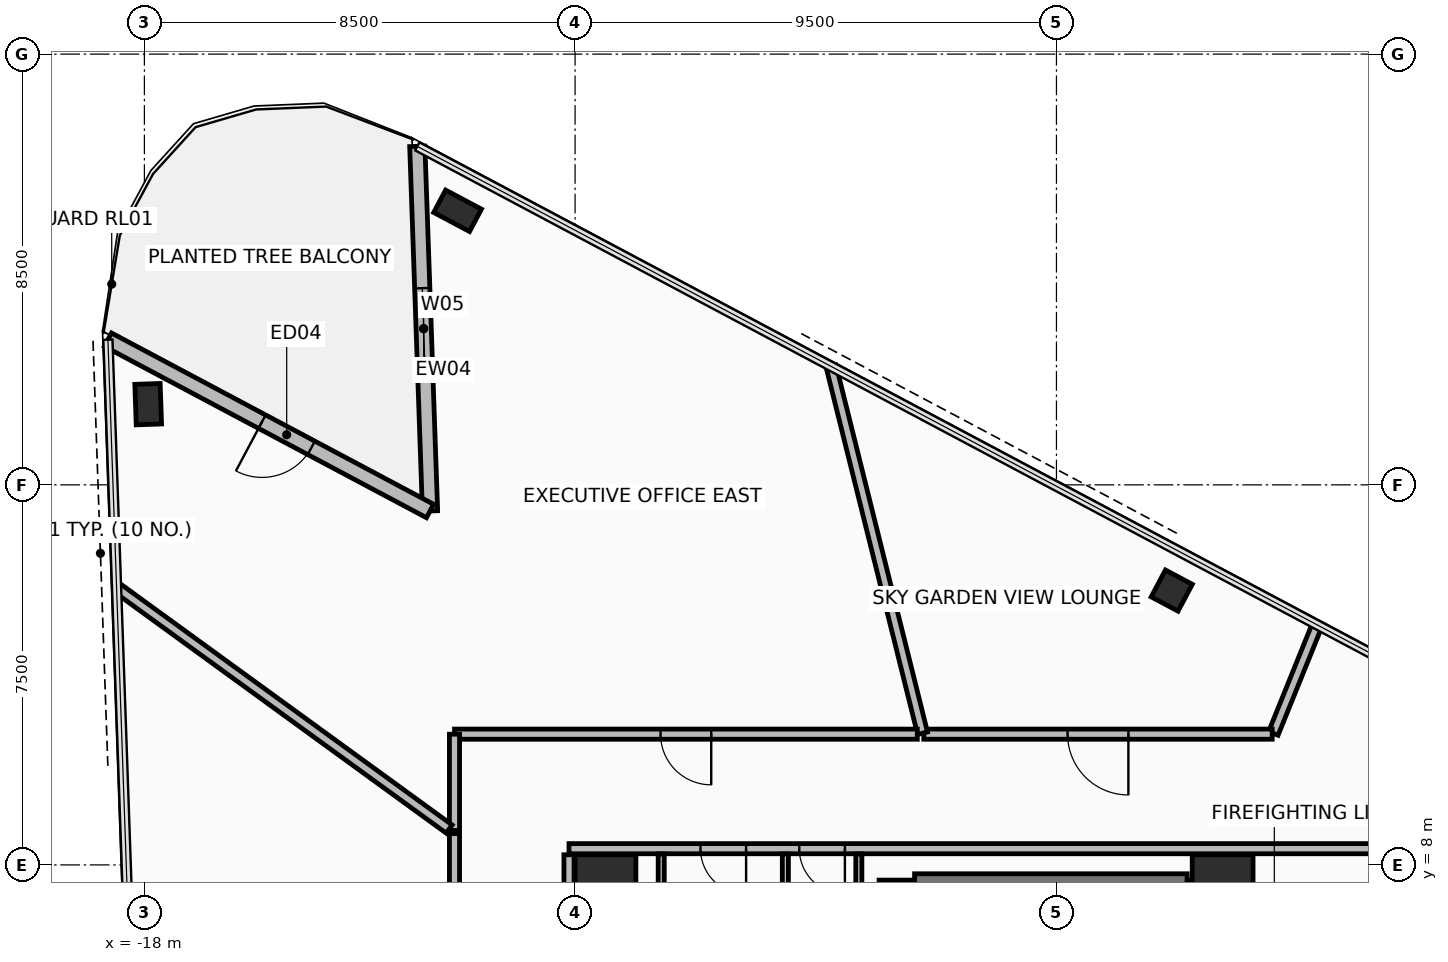
"""IFC4 building model, lengths in metres.
Left out: names, types, materials, properties, quantities, classifications, styles, units other than length and angle.
Written with IfcOpenShell. Run it as: python <this file> out.ifc"""

import sys

from ifc_helpers import new_model, si_unit, direction, frame, frame_2d, origin, origin_2d, place, context, subcontext, project, spatial, rectangle, hollow_rectangle, extrude, element, fill, save


model = new_model("IFC4")
c1 = context("Model", 3, precision=1e-05, world=origin(), true_north=direction((0.0, 1.0)))
c2 = subcontext(c1, "Body", "Model", "MODEL_VIEW")
j1 = project(units=[si_unit("LENGTHUNIT", "METRE"), si_unit("PLANEANGLEUNIT", "RADIAN")], contexts=[c1])
p1 = place(None, origin())
s1 = spatial("IfcSite", under=j1, at=p1, CompositionType="ELEMENT")
p2 = place(p1, origin())
s2 = spatial("IfcBuilding", under=s1, at=p2, CompositionType="ELEMENT")
p3 = place(p2, frame((0.0, 0.0, 146.0)))
s3 = spatial("IfcBuildingStorey", under=s2, at=p3, CompositionType="ELEMENT", Elevation=146.0)
for number, where, z_axis, x_axis in (
    (1, (3.28, 7.6, 0.0), (0.0, 0.0, 1.0), (1.0, 0.0, 0.0)),
    (2, (-8.9, 7.6, 0.0), (0.0, 0.0, 1.0), (1.0, 0.0, 0.0)),
):
    element("IfcColumn", number, at=place(p3, frame(where, z_axis=z_axis, x_axis=x_axis)), inside=s3, PredefinedType="COLUMN", context=c2, shape_type="SweptSolid", body=[
        extrude(rectangle(XDim=1.2, YDim=1.2, at=origin_2d()), origin(), (0.0, 0.0, 1.0), 3.6),
    ])
p4 = place(p3, frame((-17.925, 17.092, 0.0), z_axis=(0.0, 0.0, 1.0), x_axis=(-0.034899496703, 0.999390827019, 0.0)))
e3 = element("IfcColumn", 3, at=p4, inside=s3, PredefinedType="COLUMN", context=c2, shape_type="SweptSolid", body=[
    extrude(hollow_rectangle(XDim=0.5, YDim=0.8, WallThickness=0.04, at=origin_2d()), origin(), (0.0, 0.0, 1.0), 3.6),
])
p5 = place(p3, frame((2.276, 13.414, 0.0), z_axis=(0.0, 0.0, 1.0), x_axis=(-0.88294841224, 0.469470021751, 0.0)))
e4 = element("IfcColumn", 4, at=p5, inside=s3, PredefinedType="COLUMN", context=c2, shape_type="SweptSolid", body=[
    extrude(hollow_rectangle(XDim=0.6, YDim=0.6, WallThickness=0.036, at=origin_2d()), origin(), (0.0, 0.0, 1.0), 3.6),
])
p6 = place(p3, frame((-11.819, 20.908, 0.0), z_axis=(0.0, 0.0, 1.0), x_axis=(-0.88294841224, 0.469470021751, 0.0)))
e5 = element("IfcColumn", 5, at=p6, inside=s3, PredefinedType="COLUMN", context=c2, shape_type="SweptSolid", body=[
    extrude(hollow_rectangle(XDim=0.5, YDim=0.8, WallThickness=0.04, at=origin_2d()), origin(), (0.0, 0.0, 1.0), 3.6),
])
p7 = place(p3, frame((-12.614, 22.18, 0.0), z_axis=(0.0, 0.0, 1.0), x_axis=(0.034925918675, -0.999389903994, 0.0)))
e6 = element("IfcWall", 6, at=p7, inside=s3, PredefinedType="STANDARD", context=c2, shape_type="SweptSolid", body=[
    extrude(rectangle(XDim=7.2, YDim=0.3, at=frame_2d((3.6, 0.0))), origin(), (0.0, 0.0, 1.0), 2.705),
])
p8 = place(p7, frame((2.8, 0.0, 0.325)))
e7 = element("IfcOpeningElement", 7, at=p8, cuts=e6, PredefinedType="OPENING", context=c2, shape_type="SweptSolid", body=[
    extrude(rectangle(XDim=1.6, YDim=2.2, at=frame_2d((0.8, 1.1))), frame((0.0, 0.16, 0.0), z_axis=(0.0, -1.0, 0.0), x_axis=(1.0, 0.0, 0.0)), (0.0, 0.0, 1.0), 0.32),
])
p9 = place(p3, frame((-12.363, 14.984, 0.0), z_axis=(0.0, 0.0, 1.0), x_axis=(-0.882950149473, 0.469466754463, 0.0)))
e8 = element("IfcWall", 8, at=p9, inside=s3, PredefinedType="STANDARD", context=c2, shape_type="SweptSolid", body=[
    extrude(rectangle(XDim=7.2, YDim=0.3, at=frame_2d((3.6, 0.0))), origin(), (0.0, 0.0, 1.0), 2.705),
])
p10 = place(p9, frame((2.654, 0.0, 0.0)))
e9 = element("IfcOpeningElement", 9, at=p10, cuts=e8, PredefinedType="OPENING", context=c2, shape_type="SweptSolid", body=[
    extrude(rectangle(XDim=1.1, YDim=2.2, at=frame_2d((0.55, 1.1))), frame((0.0, 0.16, 0.0), z_axis=(0.0, -1.0, 0.0), x_axis=(1.0, 0.0, 0.0)), (0.0, 0.0, 1.0), 0.32),
])
p11 = place(p3, frame((-2.8, 7.6, 0.0), z_axis=(0.0, 0.0, 1.0), x_axis=(1.0, 0.0, 0.0)))
e10 = element("IfcWall", 10, at=p11, inside=s3, PredefinedType="SHEAR", context=c2, shape_type="SweptSolid", body=[
    extrude(rectangle(XDim=5.38, YDim=0.45, at=frame_2d((2.69, 0.0))), origin(), (0.0, 0.0, 1.0), 3.41),
])
p12 = place(p3, frame((9.62, 8.32, 0.0), z_axis=(0.0, 0.0, 1.0), x_axis=(-1.0, 0.0, 0.0)))
e11 = element("IfcWall", 11, at=p12, inside=s3, PredefinedType="PARTITIONING", context=c2, shape_type="SweptSolid", body=[
    extrude(rectangle(XDim=19.24, YDim=0.2, at=frame_2d((9.62, 0.0))), origin(), (0.0, 0.0, 1.0), 2.755),
])
p13 = place(p12, frame((15.745, 0.0, 0.0)))
e12 = element("IfcOpeningElement", 12, at=p13, cuts=e11, PredefinedType="OPENING", context=c2, shape_type="SweptSolid", body=[
    extrude(rectangle(XDim=0.9, YDim=2.1, at=frame_2d((0.45, 1.05))), frame((0.0, 0.11, 0.0), z_axis=(0.0, -1.0, 0.0), x_axis=(1.0, 0.0, 0.0)), (0.0, 0.0, 1.0), 0.22),
])
p14 = place(p12, frame((13.795, 0.0, 0.0)))
e13 = element("IfcOpeningElement", 13, at=p14, cuts=e11, PredefinedType="OPENING", context=c2, shape_type="SweptSolid", body=[
    extrude(rectangle(XDim=0.9, YDim=2.1, at=frame_2d((0.45, 1.05))), frame((0.0, 0.11, 0.0), z_axis=(0.0, -1.0, 0.0), x_axis=(1.0, 0.0, 0.0)), (0.0, 0.0, 1.0), 0.22),
])
p15 = place(p3, frame((-9.62, 8.2, 0.0), z_axis=(0.0, 0.0, 1.0), x_axis=(0.0, -1.0, 0.0)))
e14 = element("IfcWall", 14, at=p15, inside=s3, PredefinedType="PARTITIONING", context=c2, shape_type="SweptSolid", body=[
    extrude(rectangle(XDim=16.4, YDim=0.2, at=frame_2d((8.2, 0.0))), origin(), (0.0, 0.0, 1.0), 2.855),
])
p16 = place(p15, frame((12.65, 0.0, 0.0)))
e15 = element("IfcOpeningElement", 15, at=p16, cuts=e14, PredefinedType="OPENING", context=c2, shape_type="SweptSolid", body=[
    extrude(rectangle(XDim=1.1, YDim=2.15, at=frame_2d((0.55, 1.075))), frame((0.0, 0.11, 0.0), z_axis=(0.0, -1.0, 0.0), x_axis=(1.0, 0.0, 0.0)), (0.0, 0.0, 1.0), 0.22),
])
for number, where, z_axis, x_axis in (
    (16, (-3.5, 7.6, 0.0), (0.0, 0.0, 1.0), (1.0, 0.0, 0.0)),
    (17, (2.58, 7.6, 0.0), (0.0, 0.0, 1.0), (1.0, 0.0, 0.0)),
):
    element("IfcWall", number, at=place(p3, frame(where, z_axis=z_axis, x_axis=x_axis)), inside=s3, PredefinedType="PARTITIONING", context=c2, shape_type="SweptSolid", body=[
        extrude(rectangle(XDim=0.7, YDim=0.2, at=frame_2d((0.35, 0.0))), origin(), (0.0, 0.0, 1.0), 2.605),
    ])
for number, where, z_axis, x_axis in (
    (18, (-5.35, 4.765, 0.0), (0.0, 0.0, 1.0), (0.0, 1.0, 0.0)),
    (19, (-7.8, 8.215, 0.0), (0.0, 0.0, 1.0), (0.0, -1.0, 0.0)),
    (20, (-3.9, 4.765, 0.0), (0.0, 0.0, 1.0), (0.0, 1.0, 0.0)),
):
    element("IfcWall", number, at=place(p3, frame(where, z_axis=z_axis, x_axis=x_axis)), inside=s3, PredefinedType="PARTITIONING", context=c2, shape_type="SweptSolid", body=[
        extrude(rectangle(XDim=3.45, YDim=0.12, at=frame_2d((1.725, 0.0))), origin(), (0.0, 0.0, 1.0), 2.605),
    ])
p17 = place(p3, frame((5.138, 12.716, 0.0), z_axis=(0.0, 0.0, 1.0), x_axis=(-0.374646634577, -0.927167675882, 0.0)))
e21 = element("IfcWall", 21, at=p17, inside=s3, PredefinedType="PARTITIONING", context=c2, shape_type="SweptSolid", body=[
    extrude(rectangle(XDim=2.287, YDim=0.2, at=frame_2d((1.143, 0.0))), origin(), (0.0, 0.0, 1.0), 2.705),
])
p18 = place(p3, frame((4.258, 10.58, 0.0), z_axis=(0.0, 0.0, 1.0), x_axis=(-1.0, 0.0, 0.0)))
e22 = element("IfcWall", 22, at=p18, inside=s3, PredefinedType="PARTITIONING", context=c2, shape_type="SweptSolid", body=[
    extrude(rectangle(XDim=6.876, YDim=0.2, at=frame_2d((3.438, 0.0))), origin(), (0.0, 0.0, 1.0), 2.855),
])
p19 = place(p18, frame((2.838, 0.0, 0.0)))
e23 = element("IfcOpeningElement", 23, at=p19, cuts=e22, PredefinedType="OPENING", context=c2, shape_type="SweptSolid", body=[
    extrude(rectangle(XDim=1.2, YDim=2.15, at=frame_2d((0.6, 1.075))), frame((0.0, 0.11, 0.0), z_axis=(0.0, -1.0, 0.0), x_axis=(1.0, 0.0, 0.0)), (0.0, 0.0, 1.0), 0.22),
])
p20 = place(p3, frame((-2.643, 10.599, 0.0), z_axis=(0.0, 0.0, 1.0), x_axis=(-0.241942663227, 0.970290548089, 0.0)))
e24 = element("IfcWall", 24, at=p20, inside=s3, PredefinedType="PARTITIONING", context=c2, shape_type="SweptSolid", body=[
    extrude(rectangle(XDim=7.46, YDim=0.2, at=frame_2d((3.73, 0.0))), origin(), (0.0, 0.0, 1.0), 2.705),
])
p21 = place(p3, frame((-2.746, 10.58, 0.0), z_axis=(0.0, 0.0, 1.0), x_axis=(-1.0, 0.0, 0.0)))
e25 = element("IfcWall", 25, at=p21, inside=s3, PredefinedType="PARTITIONING", context=c2, shape_type="SweptSolid", body=[
    extrude(rectangle(XDim=9.133, YDim=0.2, at=frame_2d((4.567, 0.0))), origin(), (0.0, 0.0, 1.0), 2.755),
])
p22 = place(p21, frame((4.067, 0.0, 0.0)))
e26 = element("IfcOpeningElement", 26, at=p22, cuts=e25, PredefinedType="OPENING", context=c2, shape_type="SweptSolid", body=[
    extrude(rectangle(XDim=1.0, YDim=2.15, at=frame_2d((0.5, 1.075))), frame((0.0, 0.11, 0.0), z_axis=(0.0, -1.0, 0.0), x_axis=(1.0, 0.0, 0.0)), (0.0, 0.0, 1.0), 0.22),
])
p23 = place(p3, frame((-11.88, 10.579, 0.0), z_axis=(0.0, 0.0, 1.0), x_axis=(0.0, -1.0, 0.0)))
e27 = element("IfcWall", 27, at=p23, inside=s3, PredefinedType="PARTITIONING", context=c2, shape_type="SweptSolid", body=[
    extrude(rectangle(XDim=1.899, YDim=0.2, at=frame_2d((0.949, 0.0))), origin(), (0.0, 0.0, 1.0), 2.855),
])
p24 = place(p3, frame((-11.985, 8.708, 0.0), z_axis=(0.0, 0.0, 1.0), x_axis=(-0.80901356524, 0.587789972063, 0.0)))
e28 = element("IfcWall", 28, at=p24, inside=s3, PredefinedType="PARTITIONING", context=c2, shape_type="SweptSolid", body=[
    extrude(rectangle(XDim=8.102, YDim=0.2, at=frame_2d((4.051, 0.0))), origin(), (0.0, 0.0, 1.0), 2.705),
])
p25 = place(p3, frame((-11.88, 8.619, 0.0), z_axis=(0.0, 0.0, 1.0), x_axis=(0.0, -1.0, 0.0)))
e29 = element("IfcWall", 29, at=p25, inside=s3, PredefinedType="PARTITIONING", context=c2, shape_type="SweptSolid", body=[
    extrude(rectangle(XDim=10.267, YDim=0.2, at=frame_2d((5.133, 0.0))), origin(), (0.0, 0.0, 1.0), 2.855),
])
p26 = place(p25, frame((4.633, 0.0, 0.0)))
e30 = element("IfcOpeningElement", 30, at=p26, cuts=e29, PredefinedType="OPENING", context=c2, shape_type="SweptSolid", body=[
    extrude(rectangle(XDim=1.0, YDim=2.15, at=frame_2d((0.5, 1.075))), frame((0.0, 0.11, 0.0), z_axis=(0.0, -1.0, 0.0), x_axis=(1.0, 0.0, 0.0)), (0.0, 0.0, 1.0), 0.22),
])
p27 = place(p10, frame((1.1, 0.0, 0.0), z_axis=(0.0, 0.0, 1.0), x_axis=(-1.0, 0.0, 0.0)))
e31 = element("IfcDoor", 31, at=p27, inside=s3, OperationType="SINGLE_SWING_LEFT", PredefinedType="DOOR", context=c2, shape_type="SweptSolid", body=[
    extrude(rectangle(XDim=1.1, YDim=2.2, at=frame_2d((0.55, 1.1))), frame((0.0, 0.025, 0.0), z_axis=(0.0, -1.0, 0.0), x_axis=(1.0, 0.0, 0.0)), (0.0, 0.0, 1.0), 0.05),
])
fill(e9, e31)
p28 = place(p8, origin())
e32 = element("IfcWindow", 32, at=p28, inside=s3, PartitioningType="SINGLE_PANEL", PredefinedType="WINDOW", context=c2, shape_type="SweptSolid", body=[
    extrude(rectangle(XDim=1.6, YDim=2.2, at=frame_2d((0.8, 1.1))), frame((0.0, 0.03, 0.0), z_axis=(0.0, -1.0, 0.0), x_axis=(1.0, 0.0, 0.0)), (0.0, 0.0, 1.0), 0.06),
])
fill(e7, e32)
p29 = place(p13, origin())
e33 = element("IfcDoor", 33, at=p29, inside=s3, OperationType="SINGLE_SWING_LEFT", PredefinedType="DOOR", context=c2, shape_type="SweptSolid", body=[
    extrude(rectangle(XDim=0.9, YDim=2.1, at=frame_2d((0.45, 1.05))), frame((0.0, 0.025, 0.0), z_axis=(0.0, -1.0, 0.0), x_axis=(1.0, 0.0, 0.0)), (0.0, 0.0, 1.0), 0.05),
])
fill(e12, e33)
p30 = place(p14, origin())
e34 = element("IfcDoor", 34, at=p30, inside=s3, OperationType="SINGLE_SWING_LEFT", PredefinedType="DOOR", context=c2, shape_type="SweptSolid", body=[
    extrude(rectangle(XDim=0.9, YDim=2.1, at=frame_2d((0.45, 1.05))), frame((0.0, 0.025, 0.0), z_axis=(0.0, -1.0, 0.0), x_axis=(1.0, 0.0, 0.0)), (0.0, 0.0, 1.0), 0.05),
])
fill(e13, e34)
p31 = place(p19, origin())
e35 = element("IfcDoor", 35, at=p31, inside=s3, OperationType="SINGLE_SWING_LEFT", PredefinedType="DOOR", context=c2, shape_type="SweptSolid", body=[
    extrude(rectangle(XDim=1.2, YDim=2.15, at=frame_2d((0.6, 1.075))), frame((0.0, 0.025, 0.0), z_axis=(0.0, -1.0, 0.0), x_axis=(1.0, 0.0, 0.0)), (0.0, 0.0, 1.0), 0.05),
])
fill(e23, e35)
p32 = place(p22, origin())
e36 = element("IfcDoor", 36, at=p32, inside=s3, OperationType="SINGLE_SWING_RIGHT", PredefinedType="DOOR", context=c2, shape_type="SweptSolid", body=[
    extrude(rectangle(XDim=1.0, YDim=2.15, at=frame_2d((0.5, 1.075))), frame((0.0, 0.025, 0.0), z_axis=(0.0, -1.0, 0.0), x_axis=(1.0, 0.0, 0.0)), (0.0, 0.0, 1.0), 0.05),
])
fill(e26, e36)
save(model, sys.argv[1])
